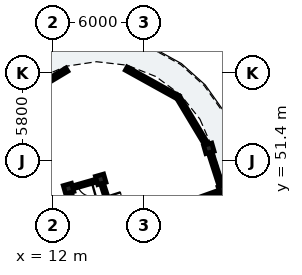
"""IFC4 building model, lengths in metres.
Left out: names, types, materials, properties, quantities, classifications, styles, units other than length and angle.
Written with IfcOpenShell. Run it as: python <this file> out.ifc"""

import sys

from ifc_helpers import new_model, si_unit, direction, frame, frame_2d, origin, origin_2d, place, context, subcontext, project, spatial, rectangle, extrude, element, fill, save


model = new_model("IFC4")
c1 = context("Model", 3, precision=1e-05, world=origin(), true_north=direction((0.0, 1.0)))
c2 = subcontext(c1, "Body", "Model", "MODEL_VIEW")
j1 = project(units=[si_unit("LENGTHUNIT", "METRE"), si_unit("PLANEANGLEUNIT", "RADIAN")], contexts=[c1])
p1 = place(None, origin())
s1 = spatial("IfcSite", under=j1, at=p1, CompositionType="ELEMENT")
p2 = place(p1, origin())
s2 = spatial("IfcBuilding", under=s1, at=p2, CompositionType="ELEMENT")
p3 = place(p2, frame((0.0, 0.0, 12.2)))
s3 = spatial("IfcBuildingStorey", under=s2, at=p3, CompositionType="ELEMENT", Elevation=12.2)
for number, where, z_axis, x_axis in (
    (1, (22.272, 52.248, 0.0), (0.0, 0.0, 1.0), (-0.961, -0.276, 0.0)),
    (2, (15.159, 50.208, 0.0), (0.0, 0.0, 1.0), (-0.961, -0.276, 0.0)),
    (3, (13.044, 49.602, 0.0), (0.0, 0.0, 1.0), (-0.961, -0.276, 0.0)),
):
    element("IfcColumn", number, at=place(p3, frame(where, z_axis=z_axis, x_axis=x_axis)), inside=s3, PredefinedType="COLUMN", context=c2, shape_type="SweptSolid", body=[
        extrude(rectangle(XDim=0.56, YDim=0.56, at=origin_2d()), origin(), (0.0, 0.0, 1.0), 3.105),
    ])
p4 = place(p3, frame((23.165, 49.479, 0.0), z_axis=(0.0, 0.0, 1.0), x_axis=(-0.941176015256, -0.337916718003, 0.0)))
e4 = element("IfcColumn", 4, at=p4, inside=s3, PredefinedType="PILASTER", context=c2, shape_type="SweptSolid", body=[
    extrude(rectangle(XDim=0.38, YDim=0.62, at=origin_2d()), origin(), (0.0, 0.0, 1.0), 3.105),
])
p5 = place(p3, frame((22.349, 52.01, 0.0), z_axis=(0.0, 0.0, 1.0), x_axis=(0.306979942778, -0.951715984279, 0.0)))
e5 = element("IfcWall", 5, at=p5, inside=s3, PredefinedType="SOLIDWALL", context=c2, shape_type="SweptSolid", body=[
    extrude(rectangle(XDim=2.499, YDim=0.245, at=frame_2d((1.25, 0.0))), origin(), (0.0, 0.0, 1.0), 2.355),
])
p6 = place(p5, frame((0.669, 0.0, 0.55)))
e6 = element("IfcOpeningElement", 6, at=p6, cuts=e5, PredefinedType="OPENING", context=c2, shape_type="SweptSolid", body=[
    extrude(rectangle(XDim=1.16, YDim=1.485, at=frame_2d((0.58, 0.743))), frame((0.0, 0.133, 0.0), z_axis=(0.0, -1.0, 0.0), x_axis=(1.0, 0.0, 0.0)), (0.0, 0.0, 1.0), 0.265),
])
p7 = place(p3, frame((23.224, 49.331, 0.0), z_axis=(0.0, 0.0, 1.0), x_axis=(0.368558756085, -0.9296044553, 0.0)))
e7 = element("IfcWall", 7, at=p7, inside=s3, PredefinedType="SOLIDWALL", context=c2, shape_type="SweptSolid", body=[
    extrude(rectangle(XDim=2.499, YDim=0.245, at=frame_2d((1.249, 0.0))), origin(), (0.0, 0.0, 1.0), 2.355),
])
p8 = place(p7, frame((0.609, 0.0, 0.55)))
e8 = element("IfcOpeningElement", 8, at=p8, cuts=e7, PredefinedType="OPENING", context=c2, shape_type="SweptSolid", body=[
    extrude(rectangle(XDim=1.28, YDim=1.56, at=frame_2d((0.64, 0.78))), frame((0.0, 0.133, 0.0), z_axis=(0.0, -1.0, 0.0), x_axis=(1.0, 0.0, 0.0)), (0.0, 0.0, 1.0), 0.265),
])
p9 = place(p3, frame((9.583, 55.412, 0.0), z_axis=(0.0, 0.0, 1.0), x_axis=(0.857178568309, 0.515019321998, 0.0)))
e9 = element("IfcWall", 9, at=p9, inside=s3, PredefinedType="SOLIDWALL", context=c2, shape_type="SweptSolid", body=[
    extrude(rectangle(XDim=3.908, YDim=0.245, at=frame_2d((1.954, 0.0))), origin(), (0.0, 0.0, 1.0), 2.355),
])
p10 = place(p9, frame((0.979, 0.0, 0.4)))
e10 = element("IfcOpeningElement", 10, at=p10, cuts=e9, PredefinedType="OPENING", context=c2, shape_type="SweptSolid", body=[
    extrude(rectangle(XDim=1.95, YDim=1.78, at=frame_2d((0.975, 0.89))), frame((0.0, 0.133, 0.0), z_axis=(0.0, -1.0, 0.0), x_axis=(1.0, 0.0, 0.0)), (0.0, 0.0, 1.0), 0.265),
])
p11 = place(p3, frame((16.841, 57.493, 0.0), z_axis=(0.0, 0.0, 1.0), x_axis=(0.874616555828, -0.48481530532, 0.0)))
e11 = element("IfcWall", 11, at=p11, inside=s3, PredefinedType="SOLIDWALL", context=c2, shape_type="SweptSolid", body=[
    extrude(rectangle(XDim=3.908, YDim=0.245, at=frame_2d((1.954, 0.0))), origin(), (0.0, 0.0, 1.0), 2.355),
])
p12 = place(p11, frame((1.029, 0.0, 0.4)))
e12 = element("IfcOpeningElement", 12, at=p12, cuts=e11, PredefinedType="OPENING", context=c2, shape_type="SweptSolid", body=[
    extrude(rectangle(XDim=1.85, YDim=1.72, at=frame_2d((0.925, 0.86))), frame((0.0, 0.133, 0.0), z_axis=(0.0, -1.0, 0.0), x_axis=(1.0, 0.0, 0.0)), (0.0, 0.0, 1.0), 0.265),
])
p13 = place(p3, frame((20.259, 55.598, 0.0), z_axis=(0.0, 0.0, 1.0), x_axis=(0.515037642827, -0.857167560324, 0.0)))
e13 = element("IfcWall", 13, at=p13, inside=s3, PredefinedType="SOLIDWALL", context=c2, shape_type="SweptSolid", body=[
    extrude(rectangle(XDim=3.908, YDim=0.245, at=frame_2d((1.954, 0.0))), origin(), (0.0, 0.0, 1.0), 2.355),
])
p14 = place(p13, frame((0.979, 0.0, 0.4)))
e14 = element("IfcOpeningElement", 14, at=p14, cuts=e13, PredefinedType="OPENING", context=c2, shape_type="SweptSolid", body=[
    extrude(rectangle(XDim=1.95, YDim=1.78, at=frame_2d((0.975, 0.89))), frame((0.0, 0.133, 0.0), z_axis=(0.0, -1.0, 0.0), x_axis=(1.0, 0.0, 0.0)), (0.0, 0.0, 1.0), 0.265),
])
p15 = place(p3, frame((13.151, 49.269, 0.0), z_axis=(0.0, 0.0, 1.0), x_axis=(0.30694495224, -0.951727269912, 0.0)))
e15 = element("IfcWall", 15, at=p15, inside=s3, PredefinedType="PARTITIONING", context=c2, shape_type="SweptSolid", body=[
    extrude(rectangle(XDim=2.837, YDim=0.195, at=frame_2d((1.418, 0.0))), origin(), (0.0, 0.0, 1.0), 2.37),
])
p16 = place(p15, frame((0.934, 0.0, 0.0)))
e16 = element("IfcOpeningElement", 16, at=p16, cuts=e15, PredefinedType="OPENING", context=c2, shape_type="SweptSolid", body=[
    extrude(rectangle(XDim=0.97, YDim=2.15, at=frame_2d((0.485, 1.075))), frame((0.0, 0.107, 0.0), z_axis=(0.0, -1.0, 0.0), x_axis=(1.0, 0.0, 0.0)), (0.0, 0.0, 1.0), 0.215),
])
p17 = place(p3, frame((15.266, 49.875, 0.0), z_axis=(0.0, 0.0, 1.0), x_axis=(0.306883578189, -0.951747061691, 0.0)))
e17 = element("IfcWall", 17, at=p17, inside=s3, PredefinedType="PARTITIONING", context=c2, shape_type="SweptSolid", body=[
    extrude(rectangle(XDim=2.693, YDim=0.195, at=frame_2d((1.346, 0.0))), origin(), (0.0, 0.0, 1.0), 2.37),
])
p18 = place(p17, frame((0.862, 0.0, 0.0)))
e18 = element("IfcOpeningElement", 18, at=p18, cuts=e17, PredefinedType="OPENING", context=c2, shape_type="SweptSolid", body=[
    extrude(rectangle(XDim=0.97, YDim=2.15, at=frame_2d((0.485, 1.075))), frame((0.0, 0.107, 0.0), z_axis=(0.0, -1.0, 0.0), x_axis=(1.0, 0.0, 0.0)), (0.0, 0.0, 1.0), 0.215),
])
p19 = place(p3, frame((22.788, 49.344, 0.0), z_axis=(0.0, 0.0, 1.0), x_axis=(-0.941179890997, -0.337905922978, 0.0)))
e19 = element("IfcWall", 19, at=p19, inside=s3, PredefinedType="PARTITIONING", context=c2, shape_type="SweptSolid", body=[
    extrude(rectangle(XDim=6.6, YDim=0.185, at=frame_2d((3.3, 0.0))), origin(), (0.0, 0.0, 1.0), 2.37),
])
p20 = place(p3, frame((15.111, 50.194, 0.0), z_axis=(0.0, 0.0, 1.0), x_axis=(-0.961264701934, -0.275626872449, 0.0)))
e20 = element("IfcWall", 20, at=p20, inside=s3, PredefinedType="PARTITIONING", context=c2, shape_type="SweptSolid", body=[
    extrude(rectangle(XDim=2.1, YDim=0.195, at=frame_2d((1.05, 0.0))), origin(), (0.0, 0.0, 1.0), 2.37),
])
p21 = place(p20, frame((0.57, 0.0, 0.0)))
e21 = element("IfcOpeningElement", 21, at=p21, cuts=e20, PredefinedType="OPENING", context=c2, shape_type="SweptSolid", body=[
    extrude(rectangle(XDim=0.95, YDim=2.13, at=frame_2d((0.475, 1.065))), frame((0.0, 0.107, 0.0), z_axis=(0.0, -1.0, 0.0), x_axis=(1.0, 0.0, 0.0)), (0.0, 0.0, 1.0), 0.215),
])
p22 = place(p6, origin())
e22 = element("IfcWindow", 22, at=p22, inside=s3, PartitioningType="SINGLE_PANEL", PredefinedType="WINDOW", context=c2, shape_type="SweptSolid", body=[
    extrude(rectangle(XDim=1.16, YDim=1.485, at=frame_2d((0.58, 0.743))), frame((0.0, 0.03, 0.0), z_axis=(0.0, -1.0, 0.0), x_axis=(1.0, 0.0, 0.0)), (0.0, 0.0, 1.0), 0.06),
])
fill(e6, e22)
p23 = place(p10, origin())
e23 = element("IfcWindow", 23, at=p23, inside=s3, PartitioningType="SINGLE_PANEL", PredefinedType="WINDOW", context=c2, shape_type="SweptSolid", body=[
    extrude(rectangle(XDim=1.95, YDim=1.78, at=frame_2d((0.975, 0.89))), frame((0.0, 0.03, 0.0), z_axis=(0.0, -1.0, 0.0), x_axis=(1.0, 0.0, 0.0)), (0.0, 0.0, 1.0), 0.06),
])
fill(e10, e23)
p24 = place(p12, origin())
e24 = element("IfcWindow", 24, at=p24, inside=s3, PartitioningType="SINGLE_PANEL", PredefinedType="WINDOW", context=c2, shape_type="SweptSolid", body=[
    extrude(rectangle(XDim=1.85, YDim=1.72, at=frame_2d((0.925, 0.86))), frame((0.0, 0.03, 0.0), z_axis=(0.0, -1.0, 0.0), x_axis=(1.0, 0.0, 0.0)), (0.0, 0.0, 1.0), 0.06),
])
fill(e12, e24)
p25 = place(p14, origin())
e25 = element("IfcWindow", 25, at=p25, inside=s3, PartitioningType="SINGLE_PANEL", PredefinedType="WINDOW", context=c2, shape_type="SweptSolid", body=[
    extrude(rectangle(XDim=1.95, YDim=1.78, at=frame_2d((0.975, 0.89))), frame((0.0, 0.03, 0.0), z_axis=(0.0, -1.0, 0.0), x_axis=(1.0, 0.0, 0.0)), (0.0, 0.0, 1.0), 0.06),
])
fill(e14, e25)
p26 = place(p21, origin())
e26 = element("IfcDoor", 26, at=p26, inside=s3, OperationType="SINGLE_SWING_LEFT", PredefinedType="DOOR", context=c2, shape_type="SweptSolid", body=[
    extrude(rectangle(XDim=0.95, YDim=2.13, at=frame_2d((0.475, 1.065))), frame((0.0, 0.025, 0.0), z_axis=(0.0, -1.0, 0.0), x_axis=(1.0, 0.0, 0.0)), (0.0, 0.0, 1.0), 0.05),
])
fill(e21, e26)
save(model, sys.argv[1])
